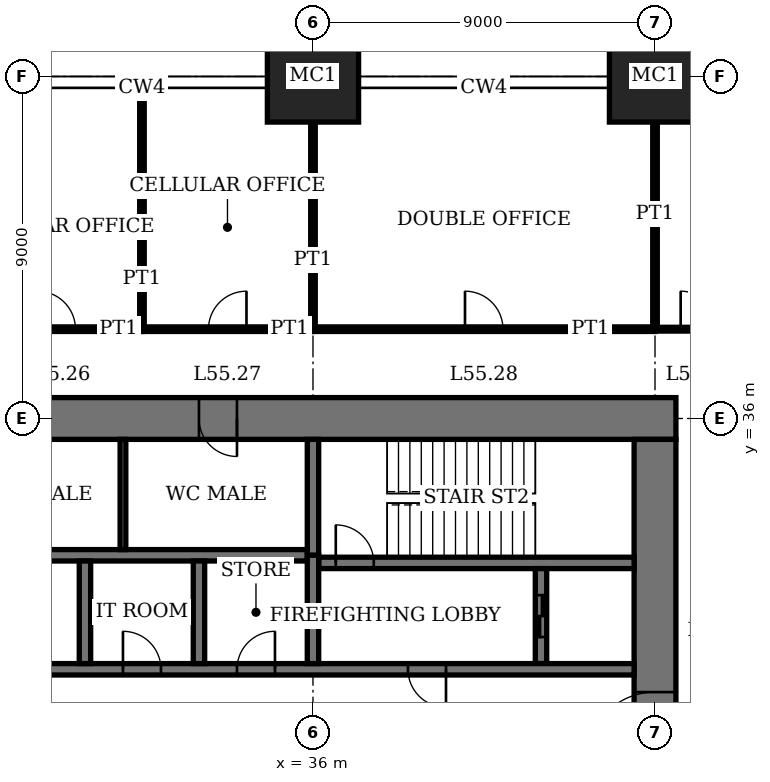
"""IFC4 building model, lengths in metres.
Left out: names, types, materials, properties, quantities, classifications, styles, units other than length and angle.
Written with IfcOpenShell. Run it as: python <this file> out.ifc"""

import sys

from ifc_helpers import new_model, si_unit, direction, frame, frame_2d, origin, origin_2d, place, context, subcontext, project, spatial, rectangle, extrude, element, fill, save


model = new_model("IFC4")
c1 = context("Model", 3, precision=1e-05, world=origin(), true_north=direction((0.0, 1.0)))
c2 = subcontext(c1, "Body", "Model", "MODEL_VIEW")
j1 = project(units=[si_unit("LENGTHUNIT", "METRE"), si_unit("PLANEANGLEUNIT", "RADIAN")], contexts=[c1])
p1 = place(None, origin())
s1 = spatial("IfcSite", under=j1, at=p1, CompositionType="ELEMENT")
p2 = place(p1, origin())
s2 = spatial("IfcBuilding", under=s1, at=p2, CompositionType="ELEMENT")
p3 = place(p2, frame((0.0, 0.0, 226.2)))
s3 = spatial("IfcBuildingStorey", under=s2, at=p3, CompositionType="ELEMENT", Elevation=226.2)
for number, where, z_axis, x_axis in (
    (1, (36.0, 45.0, 0.0), (0.0, 0.0, 1.0), (1.0, 0.0, 0.0)),
    (2, (45.0, 45.0, 0.0), (0.0, 0.0, 1.0), (1.0, 0.0, 0.0)),
):
    element("IfcColumn", number, at=place(p3, frame(where, z_axis=z_axis, x_axis=x_axis)), inside=s3, PredefinedType="COLUMN", context=c2, shape_type="SweptSolid", body=[
        extrude(rectangle(XDim=2.4, YDim=2.4, at=origin_2d()), origin(), (0.0, 0.0, 1.0), 4.0),
    ])
p4 = place(p3, frame((45.55, 36.0, 0.0), z_axis=(0.0, 0.0, 1.0), x_axis=(-1.0, 0.0, 0.0)))
e3 = element("IfcWall", 3, at=p4, inside=s3, PredefinedType="SHEAR", context=c2, shape_type="SweptSolid", body=[
    extrude(rectangle(XDim=28.1, YDim=1.1, at=frame_2d((14.05, 0.0))), origin(), (0.0, 0.0, 1.0), 4.0),
])
p5 = place(p4, frame((11.55, 0.0, 0.0)))
e4 = element("IfcOpeningElement", 4, at=p5, cuts=e3, PredefinedType="OPENING", context=c2, shape_type="SweptSolid", body=[
    extrude(rectangle(XDim=1.0, YDim=2.4, at=frame_2d((0.5, 1.2))), frame((0.0, 0.56, 0.0), z_axis=(0.0, -1.0, 0.0), x_axis=(1.0, 0.0, 0.0)), (0.0, 0.0, 1.0), 1.12),
])
p6 = place(p4, frame((16.55, 0.0, 0.0)))
e5 = element("IfcOpeningElement", 5, at=p6, cuts=e3, PredefinedType="OPENING", context=c2, shape_type="SweptSolid", body=[
    extrude(rectangle(XDim=1.0, YDim=2.4, at=frame_2d((0.5, 1.2))), frame((0.0, 0.56, 0.0), z_axis=(0.0, -1.0, 0.0), x_axis=(1.0, 0.0, 0.0)), (0.0, 0.0, 1.0), 1.12),
])
p7 = place(p4, frame((20.0, 0.0, 0.0)))
e6 = element("IfcOpeningElement", 6, at=p7, cuts=e3, PredefinedType="OPENING", context=c2, shape_type="SweptSolid", body=[
    extrude(rectangle(XDim=1.1, YDim=2.4, at=frame_2d((0.55, 1.2))), frame((0.0, 0.56, 0.0), z_axis=(0.0, -1.0, 0.0), x_axis=(1.0, 0.0, 0.0)), (0.0, 0.0, 1.0), 1.12),
])
p8 = place(p4, frame((24.05, 0.0, 0.0)))
e7 = element("IfcOpeningElement", 7, at=p8, cuts=e3, PredefinedType="OPENING", context=c2, shape_type="SweptSolid", body=[
    extrude(rectangle(XDim=1.0, YDim=2.4, at=frame_2d((0.5, 1.2))), frame((0.0, 0.56, 0.0), z_axis=(0.0, -1.0, 0.0), x_axis=(1.0, 0.0, 0.0)), (0.0, 0.0, 1.0), 1.12),
])
p9 = place(p3, frame((45.0, 18.55, 0.0), z_axis=(0.0, 0.0, 1.0), x_axis=(0.0, 1.0, 0.0)))
e8 = element("IfcWall", 8, at=p9, inside=s3, PredefinedType="SHEAR", context=c2, shape_type="SweptSolid", body=[
    extrude(rectangle(XDim=16.9, YDim=1.1, at=frame_2d((8.45, 0.0))), origin(), (0.0, 0.0, 1.0), 4.0),
])
p10 = place(p9, frame((8.45, 0.0, 0.0)))
e9 = element("IfcOpeningElement", 9, at=p10, cuts=e8, PredefinedType="OPENING", context=c2, shape_type="SweptSolid", body=[
    extrude(rectangle(XDim=1.8, YDim=2.4, at=frame_2d((0.9, 1.2))), frame((0.0, 0.56, 0.0), z_axis=(0.0, -1.0, 0.0), x_axis=(1.0, 0.0, 0.0)), (0.0, 0.0, 1.0), 1.12),
])
p11 = place(p3, frame((36.15, 32.2, 0.0), z_axis=(0.0, 0.0, 1.0), x_axis=(1.0, 0.0, 0.0)))
e10 = element("IfcWall", 10, at=p11, inside=s3, PredefinedType="SHEAR", context=c2, shape_type="SweptSolid", body=[
    extrude(rectangle(XDim=8.3, YDim=0.3, at=frame_2d((4.15, 0.0))), origin(), (0.0, 0.0, 1.0), 4.0),
])
p12 = place(p11, frame((0.45, 0.0, 0.0)))
e11 = element("IfcOpeningElement", 11, at=p12, cuts=e10, PredefinedType="OPENING", context=c2, shape_type="SweptSolid", body=[
    extrude(rectangle(XDim=1.0, YDim=2.4, at=frame_2d((0.5, 1.2))), frame((0.0, 0.16, 0.0), z_axis=(0.0, -1.0, 0.0), x_axis=(1.0, 0.0, 0.0)), (0.0, 0.0, 1.0), 0.32),
])
p13 = place(p3, frame((36.0, 32.4, 0.0), z_axis=(0.0, 0.0, 1.0), x_axis=(0.0, 1.0, 0.0)))
e12 = element("IfcWall", 12, at=p13, inside=s3, PredefinedType="SHEAR", context=c2, shape_type="SweptSolid", body=[
    extrude(rectangle(XDim=3.05, YDim=0.3, at=frame_2d((1.525, 0.0))), origin(), (0.0, 0.0, 1.0), 4.0),
])
p14 = place(p3, frame((42.0, 29.55, 0.0), z_axis=(0.0, 0.0, 1.0), x_axis=(0.0, 1.0, 0.0)))
e13 = element("IfcWall", 13, at=p14, inside=s3, PredefinedType="SHEAR", context=c2, shape_type="SweptSolid", body=[
    extrude(rectangle(XDim=2.5, YDim=0.3, at=frame_2d((1.25, 0.0))), origin(), (0.0, 0.0, 1.0), 4.0),
])
p15 = place(p14, frame((0.7, 0.0, 0.0)))
e14 = element("IfcOpeningElement", 14, at=p15, cuts=e13, PredefinedType="OPENING", context=c2, shape_type="SweptSolid", body=[
    extrude(rectangle(XDim=1.1, YDim=2.4, at=frame_2d((0.55, 1.2))), frame((0.0, 0.16, 0.0), z_axis=(0.0, -1.0, 0.0), x_axis=(1.0, 0.0, 0.0)), (0.0, 0.0, 1.0), 0.32),
])
p16 = place(p3, frame((18.55, 29.4, 0.0), z_axis=(0.0, 0.0, 1.0), x_axis=(1.0, 0.0, 0.0)))
e15 = element("IfcWall", 15, at=p16, inside=s3, PredefinedType="SHEAR", context=c2, shape_type="SweptSolid", body=[
    extrude(rectangle(XDim=25.9, YDim=0.3, at=frame_2d((12.95, 0.0))), origin(), (0.0, 0.0, 1.0), 4.0),
])
p17 = place(p16, frame((19.95, 0.0, 0.0)))
e16 = element("IfcOpeningElement", 16, at=p17, cuts=e15, PredefinedType="OPENING", context=c2, shape_type="SweptSolid", body=[
    extrude(rectangle(XDim=1.0, YDim=2.4, at=frame_2d((0.5, 1.2))), frame((0.0, 0.16, 0.0), z_axis=(0.0, -1.0, 0.0), x_axis=(1.0, 0.0, 0.0)), (0.0, 0.0, 1.0), 0.32),
])
p18 = place(p16, frame((0.5, 0.0, 0.0)))
e17 = element("IfcOpeningElement", 17, at=p18, cuts=e15, PredefinedType="OPENING", context=c2, shape_type="SweptSolid", body=[
    extrude(rectangle(XDim=0.9, YDim=2.1, at=frame_2d((0.45, 1.05))), frame((0.0, 0.16, 0.0), z_axis=(0.0, -1.0, 0.0), x_axis=(1.0, 0.0, 0.0)), (0.0, 0.0, 1.0), 0.32),
])
p19 = place(p16, frame((15.45, 0.0, 0.0)))
e18 = element("IfcOpeningElement", 18, at=p19, cuts=e15, PredefinedType="OPENING", context=c2, shape_type="SweptSolid", body=[
    extrude(rectangle(XDim=1.0, YDim=2.4, at=frame_2d((0.5, 1.2))), frame((0.0, 0.16, 0.0), z_axis=(0.0, -1.0, 0.0), x_axis=(1.0, 0.0, 0.0)), (0.0, 0.0, 1.0), 0.32),
])
p20 = place(p16, frame((12.45, 0.0, 0.0)))
e19 = element("IfcOpeningElement", 19, at=p20, cuts=e15, PredefinedType="OPENING", context=c2, shape_type="SweptSolid", body=[
    extrude(rectangle(XDim=1.0, YDim=2.4, at=frame_2d((0.5, 1.2))), frame((0.0, 0.16, 0.0), z_axis=(0.0, -1.0, 0.0), x_axis=(1.0, 0.0, 0.0)), (0.0, 0.0, 1.0), 0.32),
])
p21 = place(p16, frame((9.4, 0.0, 0.0)))
e20 = element("IfcOpeningElement", 20, at=p21, cuts=e15, PredefinedType="OPENING", context=c2, shape_type="SweptSolid", body=[
    extrude(rectangle(XDim=1.1, YDim=2.4, at=frame_2d((0.55, 1.2))), frame((0.0, 0.16, 0.0), z_axis=(0.0, -1.0, 0.0), x_axis=(1.0, 0.0, 0.0)), (0.0, 0.0, 1.0), 0.32),
])
p22 = place(p16, frame((6.4, 0.0, 0.0)))
e21 = element("IfcOpeningElement", 21, at=p22, cuts=e15, PredefinedType="OPENING", context=c2, shape_type="SweptSolid", body=[
    extrude(rectangle(XDim=1.1, YDim=2.4, at=frame_2d((0.55, 1.2))), frame((0.0, 0.16, 0.0), z_axis=(0.0, -1.0, 0.0), x_axis=(1.0, 0.0, 0.0)), (0.0, 0.0, 1.0), 0.32),
])
p23 = place(p16, frame((3.3, 0.0, 0.0)))
e22 = element("IfcOpeningElement", 22, at=p23, cuts=e15, PredefinedType="OPENING", context=c2, shape_type="SweptSolid", body=[
    extrude(rectangle(XDim=1.3, YDim=2.4, at=frame_2d((0.65, 1.2))), frame((0.0, 0.16, 0.0), z_axis=(0.0, -1.0, 0.0), x_axis=(1.0, 0.0, 0.0)), (0.0, 0.0, 1.0), 0.32),
])
p24 = place(p3, frame((18.55, 32.4, 0.0), z_axis=(0.0, 0.0, 1.0), x_axis=(1.0, 0.0, 0.0)))
e23 = element("IfcWall", 23, at=p24, inside=s3, PredefinedType="SHEAR", context=c2, shape_type="SweptSolid", body=[
    extrude(rectangle(XDim=17.3, YDim=0.3, at=frame_2d((8.65, 0.0))), origin(), (0.0, 0.0, 1.0), 4.0),
])
for number, where, z_axis, x_axis in (
    (24, (33.0, 29.55, 0.0), (0.0, 0.0, 1.0), (0.0, 1.0, 0.0)),
    (25, (30.0, 29.55, 0.0), (0.0, 0.0, 1.0), (0.0, 1.0, 0.0)),
):
    element("IfcWall", number, at=place(p3, frame(where, z_axis=z_axis, x_axis=x_axis)), inside=s3, PredefinedType="SHEAR", context=c2, shape_type="SweptSolid", body=[
        extrude(rectangle(XDim=2.7, YDim=0.3, at=frame_2d((1.35, 0.0))), origin(), (0.0, 0.0, 1.0), 4.0),
    ])
p25 = place(p3, frame((36.0, 29.55, 0.0), z_axis=(0.0, 0.0, 1.0), x_axis=(0.0, 1.0, 0.0)))
e26 = element("IfcWall", 26, at=p25, inside=s3, PredefinedType="SHEAR", context=c2, shape_type="SweptSolid", body=[
    extrude(rectangle(XDim=2.85, YDim=0.3, at=frame_2d((1.425, 0.0))), origin(), (0.0, 0.0, 1.0), 4.0),
])
p26 = place(p3, frame((27.0, 38.35, 0.0), z_axis=(0.0, 0.0, 1.0), x_axis=(1.0, 0.0, 0.0)))
e27 = element("IfcWall", 27, at=p26, inside=s3, PredefinedType="PARTITIONING", context=c2, shape_type="SweptSolid", body=[
    extrude(rectangle(XDim=4.5, YDim=0.12, at=frame_2d((2.25, 0.0))), origin(), (0.0, 0.0, 1.0), 3.75),
])
p27 = place(p26, frame((1.75, 0.0, 0.0)))
e28 = element("IfcOpeningElement", 28, at=p27, cuts=e27, PredefinedType="OPENING", context=c2, shape_type="SweptSolid", body=[
    extrude(rectangle(XDim=1.0, YDim=2.4, at=frame_2d((0.5, 1.2))), frame((0.0, 0.07, 0.0), z_axis=(0.0, -1.0, 0.0), x_axis=(1.0, 0.0, 0.0)), (0.0, 0.0, 1.0), 0.14),
])
p28 = place(p3, frame((31.5, 38.35, 0.0), z_axis=(0.0, 0.0, 1.0), x_axis=(1.0, 0.0, 0.0)))
e29 = element("IfcWall", 29, at=p28, inside=s3, PredefinedType="PARTITIONING", context=c2, shape_type="SweptSolid", body=[
    extrude(rectangle(XDim=4.5, YDim=0.12, at=frame_2d((2.25, 0.0))), origin(), (0.0, 0.0, 1.0), 3.75),
])
p29 = place(p28, frame((1.75, 0.0, 0.0)))
e30 = element("IfcOpeningElement", 30, at=p29, cuts=e29, PredefinedType="OPENING", context=c2, shape_type="SweptSolid", body=[
    extrude(rectangle(XDim=1.0, YDim=2.4, at=frame_2d((0.5, 1.2))), frame((0.0, 0.07, 0.0), z_axis=(0.0, -1.0, 0.0), x_axis=(1.0, 0.0, 0.0)), (0.0, 0.0, 1.0), 0.14),
])
p30 = place(p3, frame((36.0, 38.35, 0.0), z_axis=(0.0, 0.0, 1.0), x_axis=(1.0, 0.0, 0.0)))
e31 = element("IfcWall", 31, at=p30, inside=s3, PredefinedType="PARTITIONING", context=c2, shape_type="SweptSolid", body=[
    extrude(rectangle(XDim=9.0, YDim=0.12, at=frame_2d((4.5, 0.0))), origin(), (0.0, 0.0, 1.0), 3.75),
])
p31 = place(p30, frame((4.0, 0.0, 0.0)))
e32 = element("IfcOpeningElement", 32, at=p31, cuts=e31, PredefinedType="OPENING", context=c2, shape_type="SweptSolid", body=[
    extrude(rectangle(XDim=1.0, YDim=2.4, at=frame_2d((0.5, 1.2))), frame((0.0, 0.07, 0.0), z_axis=(0.0, -1.0, 0.0), x_axis=(1.0, 0.0, 0.0)), (0.0, 0.0, 1.0), 0.14),
])
p32 = place(p3, frame((45.0, 38.35, 0.0), z_axis=(0.0, 0.0, 1.0), x_axis=(1.0, 0.0, 0.0)))
e33 = element("IfcWall", 33, at=p32, inside=s3, PredefinedType="PARTITIONING", context=c2, shape_type="SweptSolid", body=[
    extrude(rectangle(XDim=2.35, YDim=0.1, at=frame_2d((1.175, 0.0))), origin(), (0.0, 0.0, 1.0), 3.75),
])
p33 = place(p32, frame((0.675, 0.0, 0.0)))
e34 = element("IfcOpeningElement", 34, at=p33, cuts=e33, PredefinedType="OPENING", context=c2, shape_type="SweptSolid", body=[
    extrude(rectangle(XDim=1.0, YDim=2.4, at=frame_2d((0.5, 1.2))), frame((0.0, 0.06, 0.0), z_axis=(0.0, -1.0, 0.0), x_axis=(1.0, 0.0, 0.0)), (0.0, 0.0, 1.0), 0.12),
])
p34 = place(p3, frame((31.5, 38.35, 0.0), z_axis=(0.0, 0.0, 1.0), x_axis=(0.0, 1.0, 0.0)))
e35 = element("IfcWall", 35, at=p34, inside=s3, PredefinedType="PARTITIONING", context=c2, shape_type="SweptSolid", body=[
    extrude(rectangle(XDim=6.34, YDim=0.12, at=frame_2d((3.17, 0.0))), origin(), (0.0, 0.0, 1.0), 3.75),
])
for number, where, z_axis, x_axis in (
    (36, (36.0, 38.35, 0.0), (0.0, 0.0, 1.0), (0.0, 1.0, 0.0)),
    (37, (45.0, 38.35, 0.0), (0.0, 0.0, 1.0), (0.0, 1.0, 0.0)),
):
    element("IfcWall", number, at=place(p3, frame(where, z_axis=z_axis, x_axis=x_axis)), inside=s3, PredefinedType="PARTITIONING", context=c2, shape_type="SweptSolid", body=[
        extrude(rectangle(XDim=5.45, YDim=0.12, at=frame_2d((2.725, 0.0))), origin(), (0.0, 0.0, 1.0), 3.05),
    ])
p35 = place(p3, frame((31.0, 32.55, 0.0), z_axis=(0.0, 0.0, 1.0), x_axis=(0.0, 1.0, 0.0)))
e38 = element("IfcWall", 38, at=p35, inside=s3, PredefinedType="PARTITIONING", context=c2, shape_type="SweptSolid", body=[
    extrude(rectangle(XDim=2.9, YDim=0.15, at=frame_2d((1.45, 0.0))), origin(), (0.0, 0.0, 1.0), 3.75),
])
p36 = place(p10, origin())
e39 = element("IfcDoor", 39, at=p36, inside=s3, OperationType="DOUBLE_DOOR_DOUBLE_SWING", PredefinedType="DOOR", context=c2, shape_type="SweptSolid", body=[
    extrude(rectangle(XDim=1.8, YDim=2.4, at=frame_2d((0.9, 1.2))), frame((0.0, 0.03, 0.0), z_axis=(0.0, -1.0, 0.0), x_axis=(1.0, 0.0, 0.0)), (0.0, 0.0, 1.0), 0.06),
    extrude(rectangle(XDim=0.04, YDim=2.4, at=frame_2d((0.02, 1.2))), frame((0.0, 0.55, 0.0), z_axis=(0.0, -1.0, 0.0), x_axis=(1.0, 0.0, 0.0)), (0.0, 0.0, 1.0), 1.1),
    extrude(rectangle(XDim=0.04, YDim=2.4, at=frame_2d((1.78, 1.2))), frame((0.0, 0.55, 0.0), z_axis=(0.0, -1.0, 0.0), x_axis=(1.0, 0.0, 0.0)), (0.0, 0.0, 1.0), 1.1),
    extrude(rectangle(XDim=1.8, YDim=0.04, at=frame_2d((0.9, 2.38))), frame((0.0, 0.55, 0.0), z_axis=(0.0, -1.0, 0.0), x_axis=(1.0, 0.0, 0.0)), (0.0, 0.0, 1.0), 1.1),
])
fill(e9, e39)
p37 = place(p5, origin())
e40 = element("IfcDoor", 40, at=p37, inside=s3, OperationType="SINGLE_SWING_RIGHT", PredefinedType="DOOR", context=c2, shape_type="SweptSolid", body=[
    extrude(rectangle(XDim=1.0, YDim=2.4, at=frame_2d((0.5, 1.2))), frame((0.0, 0.025, 0.0), z_axis=(0.0, -1.0, 0.0), x_axis=(1.0, 0.0, 0.0)), (0.0, 0.0, 1.0), 0.05),
    extrude(rectangle(XDim=0.04, YDim=2.4, at=frame_2d((0.02, 1.2))), frame((0.0, 0.4, 0.0), z_axis=(0.0, -1.0, 0.0), x_axis=(1.0, 0.0, 0.0)), (0.0, 0.0, 1.0), 0.8),
    extrude(rectangle(XDim=0.04, YDim=2.4, at=frame_2d((0.98, 1.2))), frame((0.0, 0.4, 0.0), z_axis=(0.0, -1.0, 0.0), x_axis=(1.0, 0.0, 0.0)), (0.0, 0.0, 1.0), 0.8),
    extrude(rectangle(XDim=1.0, YDim=0.04, at=frame_2d((0.5, 2.38))), frame((0.0, 0.4, 0.0), z_axis=(0.0, -1.0, 0.0), x_axis=(1.0, 0.0, 0.0)), (0.0, 0.0, 1.0), 0.8),
])
fill(e4, e40)
p38 = place(p12, origin())
e41 = element("IfcDoor", 41, at=p38, inside=s3, OperationType="SINGLE_SWING_RIGHT", PredefinedType="DOOR", context=c2, shape_type="SweptSolid", body=[
    extrude(rectangle(XDim=1.0, YDim=2.4, at=frame_2d((0.5, 1.2))), frame((0.0, 0.03, 0.0), z_axis=(0.0, -1.0, 0.0), x_axis=(1.0, 0.0, 0.0)), (0.0, 0.0, 1.0), 0.06),
])
fill(e11, e41)
p39 = place(p17, origin())
e42 = element("IfcDoor", 42, at=p39, inside=s3, OperationType="SINGLE_SWING_RIGHT", PredefinedType="DOOR", context=c2, shape_type="SweptSolid", body=[
    extrude(rectangle(XDim=1.0, YDim=2.4, at=frame_2d((0.5, 1.2))), frame((0.0, 0.03, 0.0), z_axis=(0.0, -1.0, 0.0), x_axis=(1.0, 0.0, 0.0)), (0.0, 0.0, 1.0), 0.06),
])
fill(e16, e42)
p40 = place(p27, origin())
e43 = element("IfcDoor", 43, at=p40, inside=s3, OperationType="SINGLE_SWING_RIGHT", PredefinedType="DOOR", context=c2, shape_type="SweptSolid", body=[
    extrude(rectangle(XDim=1.0, YDim=2.4, at=frame_2d((0.5, 1.2))), frame((0.0, 0.025, 0.0), z_axis=(0.0, -1.0, 0.0), x_axis=(1.0, 0.0, 0.0)), (0.0, 0.0, 1.0), 0.05),
])
fill(e28, e43)
p41 = place(p29, origin())
e44 = element("IfcDoor", 44, at=p41, inside=s3, OperationType="SINGLE_SWING_LEFT", PredefinedType="DOOR", context=c2, shape_type="SweptSolid", body=[
    extrude(rectangle(XDim=1.0, YDim=2.4, at=frame_2d((0.5, 1.2))), frame((0.0, 0.025, 0.0), z_axis=(0.0, -1.0, 0.0), x_axis=(1.0, 0.0, 0.0)), (0.0, 0.0, 1.0), 0.05),
])
fill(e30, e44)
p42 = place(p31, origin())
e45 = element("IfcDoor", 45, at=p42, inside=s3, OperationType="SINGLE_SWING_RIGHT", PredefinedType="DOOR", context=c2, shape_type="SweptSolid", body=[
    extrude(rectangle(XDim=1.0, YDim=2.4, at=frame_2d((0.5, 1.2))), frame((0.0, 0.025, 0.0), z_axis=(0.0, -1.0, 0.0), x_axis=(1.0, 0.0, 0.0)), (0.0, 0.0, 1.0), 0.05),
])
fill(e32, e45)
p43 = place(p33, origin())
e46 = element("IfcDoor", 46, at=p43, inside=s3, OperationType="SINGLE_SWING_RIGHT", PredefinedType="DOOR", context=c2, shape_type="SweptSolid", body=[
    extrude(rectangle(XDim=1.0, YDim=2.4, at=frame_2d((0.5, 1.2))), frame((0.0, 0.02, 0.0), z_axis=(0.0, -1.0, 0.0), x_axis=(1.0, 0.0, 0.0)), (0.0, 0.0, 1.0), 0.04),
])
fill(e34, e46)
p44 = place(p19, origin())
e47 = element("IfcDoor", 47, at=p44, inside=s3, OperationType="SINGLE_SWING_LEFT", PredefinedType="DOOR", context=c2, shape_type="SweptSolid", body=[
    extrude(rectangle(XDim=1.0, YDim=2.4, at=frame_2d((0.5, 1.2))), frame((0.0, 0.03, 0.0), z_axis=(0.0, -1.0, 0.0), x_axis=(1.0, 0.0, 0.0)), (0.0, 0.0, 1.0), 0.06),
])
fill(e18, e47)
p45 = place(p20, origin())
e48 = element("IfcDoor", 48, at=p45, inside=s3, OperationType="SINGLE_SWING_RIGHT", PredefinedType="DOOR", context=c2, shape_type="SweptSolid", body=[
    extrude(rectangle(XDim=1.0, YDim=2.4, at=frame_2d((0.5, 1.2))), frame((0.0, 0.03, 0.0), z_axis=(0.0, -1.0, 0.0), x_axis=(1.0, 0.0, 0.0)), (0.0, 0.0, 1.0), 0.06),
])
fill(e19, e48)
p46 = place(p15, origin())
e49 = element("IfcDoor", 49, at=p46, inside=s3, OperationType="DOUBLE_DOOR_SLIDING", PredefinedType="DOOR", context=c2, shape_type="SweptSolid", body=[
    extrude(rectangle(XDim=1.1, YDim=2.4, at=frame_2d((0.55, 1.2))), frame((0.0, 0.03, 0.0), z_axis=(0.0, -1.0, 0.0), x_axis=(1.0, 0.0, 0.0)), (0.0, 0.0, 1.0), 0.06),
])
fill(e14, e49)
save(model, sys.argv[1])
